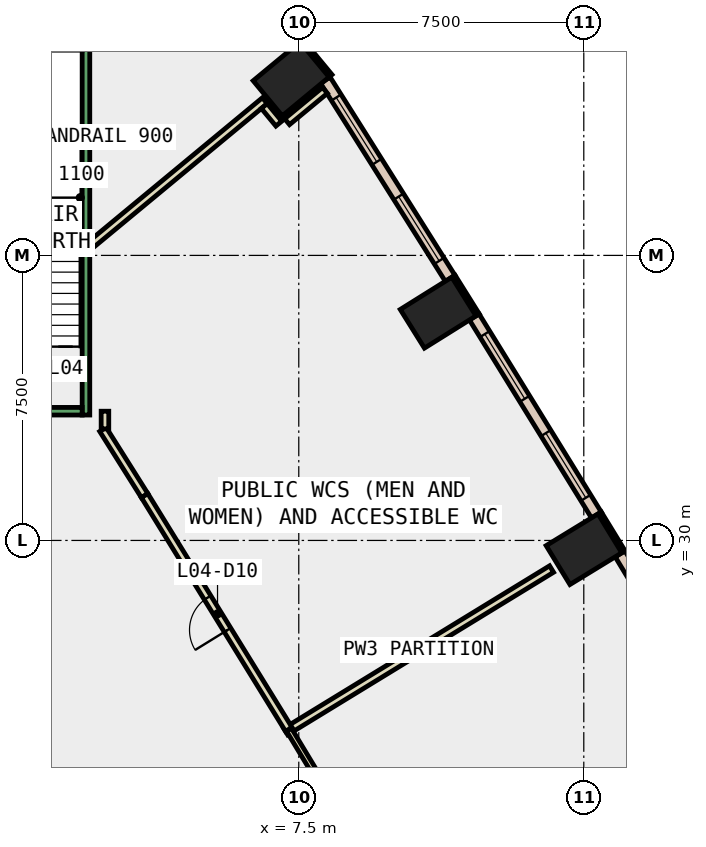
"""IFC4 building model, lengths in metres.
Left out: names, types, materials, properties, quantities, classifications, styles, units other than length and angle.
Written with IfcOpenShell. Run it as: python <this file> out.ifc"""

import sys

from ifc_helpers import new_model, si_unit, direction, frame, frame_2d, origin, origin_2d, place, context, subcontext, project, spatial, rectangle, extrude, element, fill, save


model = new_model("IFC4")
c1 = context("Model", 3, precision=1e-05, world=origin(), true_north=direction((0.0, 1.0)))
c2 = subcontext(c1, "Body", "Model", "MODEL_VIEW")
j1 = project(units=[si_unit("LENGTHUNIT", "METRE"), si_unit("PLANEANGLEUNIT", "RADIAN")], contexts=[c1])
p1 = place(None, origin())
s1 = spatial("IfcSite", under=j1, at=p1, CompositionType="ELEMENT")
p2 = place(p1, origin())
s2 = spatial("IfcBuilding", under=s1, at=p2, CompositionType="ELEMENT")
p3 = place(p2, frame((0.0, 0.0, 25.0)))
s3 = spatial("IfcBuildingStorey", under=s2, at=p3, CompositionType="ELEMENT", Elevation=25.0)
for number, where, z_axis, x_axis in (
    (1, (15.005, 29.769, -0.45), (0.0, 0.0, 1.0), (-0.522, 0.853, 0.0)),
    (2, (11.167, 35.993, -0.45), (0.0, 0.0, 1.0), (-0.53, 0.848, 0.0)),
    (3, (7.299, 42.144, -0.45), (0.0, 0.0, 1.0), (-0.638, 0.77, 0.0)),
):
    element("IfcColumn", number, at=place(p3, frame(where, z_axis=z_axis, x_axis=x_axis)), inside=s3, PredefinedType="COLUMN", context=c2, shape_type="SweptSolid", body=[
        extrude(rectangle(XDim=1.2, YDim=1.6, at=origin_2d()), origin(), (0.0, 0.0, 1.0), 5.0),
    ])
p4 = place(p3, frame((16.043, 29.7, 0.0), z_axis=(0.0, 0.0, 1.0), x_axis=(-0.521507599072, 0.853246637327, 0.0)))
e4 = element("IfcWall", 4, at=p4, inside=s3, PredefinedType="STANDARD", context=c2, shape_type="SweptSolid", body=[
    extrude(rectangle(XDim=1.2, YDim=0.1, at=frame_2d((0.6, 0.0))), origin(), (0.0, 0.0, 1.0), 4.55),
])
for number, where, z_axis, x_axis in (
    (5, (12.206, 35.935, 0.0), (0.0, 0.0, 1.0), (-0.53, 0.848, 0.0)),
    (6, (8.336, 42.224, 0.0), (0.0, 0.0, 1.0), (-0.638, 0.77, 0.0)),
):
    element("IfcWall", number, at=place(p3, frame(where, z_axis=z_axis, x_axis=x_axis)), inside=s3, PredefinedType="STANDARD", context=c2, shape_type="SweptSolid", body=[
        extrude(rectangle(XDim=1.199, YDim=0.1, at=frame_2d((0.6, 0.0))), origin(), (0.0, 0.0, 1.0), 4.55),
    ])
p5 = place(p3, frame((19.117, 24.406, 0.0), z_axis=(0.0, 0.0, 1.0), x_axis=(-0.516687651362, 0.85617397235, 0.0)))
e7 = element("IfcWall", 7, at=p5, inside=s3, PredefinedType="STANDARD", context=c2, shape_type="SweptSolid", body=[
    extrude(rectangle(XDim=6.121, YDim=0.3, at=frame_2d((3.061, 0.0))), origin(), (0.0, 0.0, 1.0), 4.55),
])
p6 = place(p5, frame((0.53, 0.0, 1.0)))
e8 = element("IfcOpeningElement", 8, at=p6, cuts=e7, PredefinedType="OPENING", context=c2, shape_type="SweptSolid", body=[
    extrude(rectangle(XDim=2.0, YDim=3.2, at=frame_2d((1.0, 1.6))), frame((0.0, 0.16, 0.0), z_axis=(0.0, -1.0, 0.0), x_axis=(1.0, 0.0, 0.0)), (0.0, 0.0, 1.0), 0.32),
])
p7 = place(p5, frame((3.591, 0.0, 1.0)))
e9 = element("IfcOpeningElement", 9, at=p7, cuts=e7, PredefinedType="OPENING", context=c2, shape_type="SweptSolid", body=[
    extrude(rectangle(XDim=2.0, YDim=3.2, at=frame_2d((1.0, 1.6))), frame((0.0, 0.16, 0.0), z_axis=(0.0, -1.0, 0.0), x_axis=(1.0, 0.0, 0.0)), (0.0, 0.0, 1.0), 0.32),
])
p8 = place(p3, frame((15.331, 30.67, 0.0), z_axis=(0.0, 0.0, 1.0), x_axis=(-0.524953701886, 0.85113078365, 0.0)))
e10 = element("IfcWall", 10, at=p8, inside=s3, PredefinedType="STANDARD", context=c2, shape_type="SweptSolid", body=[
    extrude(rectangle(XDim=6.123, YDim=0.3, at=frame_2d((3.061, 0.0))), origin(), (0.0, 0.0, 1.0), 4.55),
])
p9 = place(p8, frame((0.531, 0.0, 1.0)))
e11 = element("IfcOpeningElement", 11, at=p9, cuts=e10, PredefinedType="OPENING", context=c2, shape_type="SweptSolid", body=[
    extrude(rectangle(XDim=2.0, YDim=3.2, at=frame_2d((1.0, 1.6))), frame((0.0, 0.16, 0.0), z_axis=(0.0, -1.0, 0.0), x_axis=(1.0, 0.0, 0.0)), (0.0, 0.0, 1.0), 0.32),
])
p10 = place(p8, frame((3.592, 0.0, 1.0)))
e12 = element("IfcOpeningElement", 12, at=p10, cuts=e10, PredefinedType="OPENING", context=c2, shape_type="SweptSolid", body=[
    extrude(rectangle(XDim=2.0, YDim=3.2, at=frame_2d((1.0, 1.6))), frame((0.0, 0.16, 0.0), z_axis=(0.0, -1.0, 0.0), x_axis=(1.0, 0.0, 0.0)), (0.0, 0.0, 1.0), 0.32),
])
p11 = place(p3, frame((11.483, 36.897, 0.0), z_axis=(0.0, 0.0, 1.0), x_axis=(-0.53304020879, 0.846089910006, 0.0)))
e13 = element("IfcWall", 13, at=p11, inside=s3, PredefinedType="STANDARD", context=c2, shape_type="SweptSolid", body=[
    extrude(rectangle(XDim=6.163, YDim=0.3, at=frame_2d((3.081, 0.0))), origin(), (0.0, 0.0, 1.0), 4.55),
])
p12 = place(p11, frame((0.541, 0.0, 1.0)))
e14 = element("IfcOpeningElement", 14, at=p12, cuts=e13, PredefinedType="OPENING", context=c2, shape_type="SweptSolid", body=[
    extrude(rectangle(XDim=2.0, YDim=3.2, at=frame_2d((1.0, 1.6))), frame((0.0, 0.16, 0.0), z_axis=(0.0, -1.0, 0.0), x_axis=(1.0, 0.0, 0.0)), (0.0, 0.0, 1.0), 0.32),
])
p13 = place(p11, frame((3.622, 0.0, 1.0)))
e15 = element("IfcOpeningElement", 15, at=p13, cuts=e13, PredefinedType="OPENING", context=c2, shape_type="SweptSolid", body=[
    extrude(rectangle(XDim=2.0, YDim=3.2, at=frame_2d((1.0, 1.6))), frame((0.0, 0.16, 0.0), z_axis=(0.0, -1.0, 0.0), x_axis=(1.0, 0.0, 0.0)), (0.0, 0.0, 1.0), 0.32),
])
p14 = place(p3, frame((7.156, 24.97, 0.0), z_axis=(0.0, 0.0, 1.0), x_axis=(0.853189087451, 0.52160174564, 0.0)))
e16 = element("IfcWall", 16, at=p14, inside=s3, PredefinedType="PARTITIONING", context=c2, shape_type="SweptSolid", body=[
    extrude(rectangle(XDim=8.2, YDim=0.2, at=frame_2d((4.1, 0.0))), origin(), (0.0, 0.0, 1.0), 4.55),
])
p15 = place(p3, frame((10.968, 18.845, 0.0), z_axis=(0.0, 0.0, 1.0), x_axis=(-0.516619201563, 0.856215277005, 0.0)))
e17 = element("IfcWall", 17, at=p15, inside=s3, PredefinedType="PARTITIONING", context=c2, shape_type="SweptSolid", body=[
    extrude(rectangle(XDim=7.214, YDim=0.15, at=frame_2d((3.607, 0.0))), origin(), (0.0, 0.0, 1.0), 4.55),
])
p16 = place(p15, frame((0.534, 0.0, 0.0)))
e18 = element("IfcOpeningElement", 18, at=p16, cuts=e17, PredefinedType="OPENING", context=c2, shape_type="SweptSolid", body=[
    extrude(rectangle(XDim=1.0, YDim=2.1, at=frame_2d((0.5, 1.05))), frame((0.0, 0.085, 0.0), z_axis=(0.0, -1.0, 0.0), x_axis=(1.0, 0.0, 0.0)), (0.0, 0.0, 1.0), 0.17),
])
p17 = place(p3, frame((2.0, 37.758, 0.0), z_axis=(0.0, 0.0, 1.0), x_axis=(0.7702988792, 0.637683022122, 0.0)))
e19 = element("IfcWall", 19, at=p17, inside=s3, PredefinedType="PARTITIONING", context=c2, shape_type="SweptSolid", body=[
    extrude(rectangle(XDim=5.979, YDim=0.2, at=frame_2d((2.99, 0.0))), origin(), (0.0, 0.0, 1.0), 4.55),
])
p18 = place(p3, frame((6.593, 41.43, 0.0), z_axis=(0.0, 0.0, 1.0), x_axis=(0.636576557089, -0.771213515808, 0.0)))
e20 = element("IfcWall", 20, at=p18, inside=s3, PredefinedType="PARTITIONING", context=c2, shape_type="SweptSolid", body=[
    extrude(rectangle(XDim=0.6, YDim=0.2, at=frame_2d((0.3, 0.0))), origin(), (0.0, 0.0, 1.0), 4.55),
])
p19 = place(p3, frame((7.193, 41.018, 0.0), z_axis=(0.0, 0.0, 1.0), x_axis=(0.77046149962, 0.637486531311, 0.0)))
e21 = element("IfcWall", 21, at=p19, inside=s3, PredefinedType="PARTITIONING", context=c2, shape_type="SweptSolid", body=[
    extrude(rectangle(XDim=1.292, YDim=0.2, at=frame_2d((0.646, 0.0))), origin(), (0.0, 0.0, 1.0), 4.55),
])
p20 = place(p3, frame((3.444, 31.179, 0.0), z_axis=(0.0, 0.0, 1.0), x_axis=(-0.53294851268, 0.846147672001, 0.0)))
e22 = element("IfcWall", 22, at=p20, inside=s3, PredefinedType="PARTITIONING", context=c2, shape_type="SweptSolid", body=[
    extrude(rectangle(XDim=2.059, YDim=0.2, at=frame_2d((1.029, 0.0))), origin(), (0.0, 0.0, 1.0), 4.55),
])
p21 = place(p3, frame((2.4, 32.936, 0.0), z_axis=(0.0, 0.0, 1.0), x_axis=(0.0, 1.0, 0.0)))
e23 = element("IfcWall", 23, at=p21, inside=s3, PredefinedType="PARTITIONING", context=c2, shape_type="SweptSolid", body=[
    extrude(rectangle(XDim=0.464, YDim=0.2, at=frame_2d((0.232, 0.0))), origin(), (0.0, 0.0, 1.0), 4.55),
])
p22 = place(p3, frame((7.236, 25.03, 0.0), z_axis=(0.0, 0.0, 1.0), x_axis=(-0.524904209579, 0.851161307137, 0.0)))
e24 = element("IfcWall", 24, at=p22, inside=s3, PredefinedType="PARTITIONING", context=c2, shape_type="SweptSolid", body=[
    extrude(rectangle(XDim=7.224, YDim=0.2, at=frame_2d((3.612, 0.0))), origin(), (0.0, 0.0, 1.0), 4.55),
])
p23 = place(p22, frame((3.07, 0.0, 0.0)))
e25 = element("IfcOpeningElement", 25, at=p23, cuts=e24, PredefinedType="OPENING", context=c2, shape_type="SweptSolid", body=[
    extrude(rectangle(XDim=1.0, YDim=2.1, at=frame_2d((0.5, 1.05))), frame((0.0, 0.11, 0.0), z_axis=(0.0, -1.0, 0.0), x_axis=(1.0, 0.0, 0.0)), (0.0, 0.0, 1.0), 0.22),
])
p24 = place(p3, frame((1.9, 33.3, 0.0), z_axis=(0.0, 0.0, 1.0), x_axis=(0.0, 1.0, 0.0)))
e26 = element("IfcWall", 26, at=p24, inside=s3, PredefinedType="STANDARD", context=c2, shape_type="SweptSolid", body=[
    extrude(rectangle(XDim=9.8, YDim=0.2, at=frame_2d((4.9, 0.0))), origin(), (0.0, 0.0, 1.0), 4.55),
])
p25 = place(p3, frame((1.8, 33.4, 0.0), z_axis=(0.0, 0.0, 1.0), x_axis=(-1.0, 0.0, 0.0)))
e27 = element("IfcWall", 27, at=p25, inside=s3, PredefinedType="STANDARD", context=c2, shape_type="SweptSolid", body=[
    extrude(rectangle(XDim=3.6, YDim=0.2, at=frame_2d((1.8, 0.0))), origin(), (0.0, 0.0, 1.0), 4.55),
])
p26 = place(p25, frame((1.2, 0.0, 0.0)))
e28 = element("IfcOpeningElement", 28, at=p26, cuts=e27, PredefinedType="OPENING", context=c2, shape_type="SweptSolid", body=[
    extrude(rectangle(XDim=1.2, YDim=2.2, at=frame_2d((0.6, 1.1))), frame((0.0, 0.11, 0.0), z_axis=(0.0, -1.0, 0.0), x_axis=(1.0, 0.0, 0.0)), (0.0, 0.0, 1.0), 0.22),
])
p27 = place(p9, origin())
e29 = element("IfcWindow", 29, at=p27, inside=s3, PartitioningType="SINGLE_PANEL", PredefinedType="WINDOW", context=c2, shape_type="SweptSolid", body=[
    extrude(rectangle(XDim=2.0, YDim=3.2, at=frame_2d((1.0, 1.6))), frame((0.0, 0.03, 0.0), z_axis=(0.0, -1.0, 0.0), x_axis=(1.0, 0.0, 0.0)), (0.0, 0.0, 1.0), 0.06),
])
fill(e11, e29)
p28 = place(p10, origin())
e30 = element("IfcWindow", 30, at=p28, inside=s3, PartitioningType="SINGLE_PANEL", PredefinedType="WINDOW", context=c2, shape_type="SweptSolid", body=[
    extrude(rectangle(XDim=2.0, YDim=3.2, at=frame_2d((1.0, 1.6))), frame((0.0, 0.03, 0.0), z_axis=(0.0, -1.0, 0.0), x_axis=(1.0, 0.0, 0.0)), (0.0, 0.0, 1.0), 0.06),
])
fill(e12, e30)
p29 = place(p12, origin())
e31 = element("IfcWindow", 31, at=p29, inside=s3, PartitioningType="SINGLE_PANEL", PredefinedType="WINDOW", context=c2, shape_type="SweptSolid", body=[
    extrude(rectangle(XDim=2.0, YDim=3.2, at=frame_2d((1.0, 1.6))), frame((0.0, 0.03, 0.0), z_axis=(0.0, -1.0, 0.0), x_axis=(1.0, 0.0, 0.0)), (0.0, 0.0, 1.0), 0.06),
])
fill(e14, e31)
p30 = place(p13, origin())
e32 = element("IfcWindow", 32, at=p30, inside=s3, PartitioningType="SINGLE_PANEL", PredefinedType="WINDOW", context=c2, shape_type="SweptSolid", body=[
    extrude(rectangle(XDim=2.0, YDim=3.2, at=frame_2d((1.0, 1.6))), frame((0.0, 0.03, 0.0), z_axis=(0.0, -1.0, 0.0), x_axis=(1.0, 0.0, 0.0)), (0.0, 0.0, 1.0), 0.06),
])
fill(e15, e32)
p31 = place(p23, origin())
e33 = element("IfcDoor", 33, at=p31, inside=s3, OperationType="SINGLE_SWING_RIGHT", PredefinedType="DOOR", context=c2, shape_type="SweptSolid", body=[
    extrude(rectangle(XDim=1.0, YDim=2.1, at=frame_2d((0.5, 1.05))), frame((0.0, 0.025, 0.0), z_axis=(0.0, -1.0, 0.0), x_axis=(1.0, 0.0, 0.0)), (0.0, 0.0, 1.0), 0.05),
])
fill(e25, e33)
save(model, sys.argv[1])
